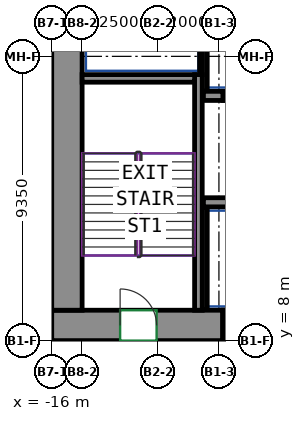
"""IFC4 building model, lengths in metres.
Left out: names, types, materials, properties, quantities, classifications, styles, units other than length and angle.
Written with IfcOpenShell. Run it as: python <this file> out.ifc"""

import sys

from ifc_helpers import new_model, si_unit, direction, frame, frame_2d, origin, place, context, subcontext, project, spatial, rectangle, extrude, source, transform, mapped, element, fill, save


model = new_model("IFC4")
c1 = context("Model", 3, precision=1e-05, world=origin(), true_north=direction((0.0, 1.0)))
c2 = subcontext(c1, "Body", "Model", "MODEL_VIEW")
j1 = project(units=[si_unit("LENGTHUNIT", "METRE"), si_unit("PLANEANGLEUNIT", "RADIAN")], contexts=[c1])
p1 = place(None, origin())
s1 = spatial("IfcSite", under=j1, at=p1, CompositionType="ELEMENT")
p2 = place(p1, origin())
s2 = spatial("IfcBuilding", under=s1, at=p2, CompositionType="ELEMENT")
p3 = place(p2, frame((0.0, 0.0, 13.5)))
s3 = spatial("IfcBuildingStorey", under=s2, at=p3, CompositionType="ELEMENT", Elevation=13.5)
m1 = source(origin(), c2, "Body", "SweptSolid", [
    extrude(rectangle(XDim=5.63, YDim=1.0, at=frame_2d((2.815, 0.0))), origin(), (0.0, 0.0, 1.0), 4.1),
])
p4 = place(p3, frame((-16.0, 8.5, 0.0), z_axis=(0.0, 0.0, 1.0), x_axis=(1.0, 0.0, 0.0)))
e1 = element("IfcWall", 1, at=p4, inside=s3, PredefinedType="SHEAR", context=c2, shape_type="MappedRepresentation", body=[
    mapped(m1, transform((0.0, 0.0, 0.0))),
])
p5 = place(p4, frame((2.25, 0.0, 0.0)))
e2 = element("IfcOpeningElement", 2, at=p5, cuts=e1, PredefinedType="OPENING", context=c2, shape_type="SweptSolid", body=[
    extrude(rectangle(XDim=1.2, YDim=2.1, at=frame_2d((0.6, 1.05))), frame((0.0, 0.51, 0.0), z_axis=(0.0, -1.0, 0.0), x_axis=(1.0, 0.0, 0.0)), (0.0, 0.0, 1.0), 1.02),
])
m2 = source(origin(), c2, "Body", "SweptSolid", [
    extrude(rectangle(XDim=12.0, YDim=1.0, at=frame_2d((6.0, 0.0))), origin(), (0.0, 0.0, 1.0), 4.1),
])
p6 = place(p3, frame((-15.5, 9.0, 0.0), z_axis=(0.0, 0.0, 1.0), x_axis=(0.0, 1.0, 0.0)))
e3 = element("IfcWall", 3, at=p6, inside=s3, PredefinedType="SHEAR", context=c2, shape_type="MappedRepresentation", body=[
    mapped(m2, transform((0.0, 0.0, 0.0))),
])
m3 = source(origin(), c2, "Body", "SweptSolid", [
    extrude(rectangle(XDim=7.75, YDim=0.25, at=frame_2d((3.875, 0.0))), origin(), (0.0, 0.0, 1.0), 4.1),
])
p7 = place(p3, frame((-11.175, 9.0, 0.0), z_axis=(0.0, 0.0, 1.0), x_axis=(0.0, 1.0, 0.0)))
e4 = element("IfcWall", 4, at=p7, inside=s3, PredefinedType="SHEAR", context=c2, shape_type="MappedRepresentation", body=[
    mapped(m3, transform((0.0, 0.0, 0.0))),
])
m4 = source(origin(), c2, "Body", "SweptSolid", [
    extrude(rectangle(XDim=3.7, YDim=0.25, at=frame_2d((1.85, 0.0))), origin(), (0.0, 0.0, 1.0), 4.1),
])
p8 = place(p3, frame((-15.0, 16.625, 0.0), z_axis=(0.0, 0.0, 1.0), x_axis=(1.0, 0.0, 0.0)))
e5 = element("IfcWall", 5, at=p8, inside=s3, PredefinedType="SHEAR", context=c2, shape_type="MappedRepresentation", body=[
    mapped(m4, transform((0.0, 0.0, 0.0))),
])
m5 = source(origin(), c2, "Body", "SweptSolid", [
    extrude(rectangle(XDim=6.0, YDim=0.3, at=frame_2d((3.0, 0.0))), origin(), (0.0, 0.0, 1.0), 4.1),
])
p9 = place(p3, frame((-11.01, 12.55, 0.0), z_axis=(0.0, 0.0, 1.0), x_axis=(1.0, 0.0, 0.0)))
e6 = element("IfcWall", 6, at=p9, inside=s3, PredefinedType="SHEAR", context=c2, shape_type="MappedRepresentation", body=[
    mapped(m5, transform((0.0, 0.0, 0.0))),
])
m6 = source(origin(), c2, "Body", "SweptSolid", [
    extrude(rectangle(XDim=0.64, YDim=0.3, at=frame_2d((0.32, 0.0))), origin(), (0.0, 0.0, 1.0), 4.1),
])
p10 = place(p3, frame((-11.01, 16.05, 0.0), z_axis=(0.0, 0.0, 1.0), x_axis=(1.0, 0.0, 0.0)))
e7 = element("IfcWall", 7, at=p10, inside=s3, PredefinedType="SHEAR", context=c2, shape_type="MappedRepresentation", body=[
    mapped(m6, transform((0.0, 0.0, 0.0))),
])
m7 = source(origin(), c2, "Body", "SweptSolid", [
    extrude(rectangle(XDim=1.4, YDim=1.0, at=frame_2d((0.7, 0.0))), origin(), (0.0, 0.0, 1.0), 0.2),
])
p11 = place(p3, frame((-10.37, 8.5, 3.9), z_axis=(0.0, 0.0, 1.0), x_axis=(1.0, 0.0, 0.0)))
e8 = element("IfcWall", 8, at=p11, inside=s3, PredefinedType="SHEAR", context=c2, shape_type="MappedRepresentation", body=[
    mapped(m7, transform((0.0, 0.0, 0.0))),
])
m8 = source(origin(), c2, "Body", "SweptSolid", [
    extrude(rectangle(XDim=1.4, YDim=0.3, at=frame_2d((0.7, 0.0))), origin(), (0.0, 0.0, 1.0), 4.1),
])
p12 = place(p3, frame((-10.37, 16.05, 0.0), z_axis=(0.0, 0.0, 1.0), x_axis=(1.0, 0.0, 0.0)))
e9 = element("IfcWall", 9, at=p12, inside=s3, PredefinedType="PARTITIONING", context=c2, shape_type="MappedRepresentation", body=[
    mapped(m8, transform((0.0, 0.0, 0.0))),
])
p13 = place(p12, frame((0.15, 0.0, 0.0)))
e10 = element("IfcOpeningElement", 10, at=p13, cuts=e9, PredefinedType="OPENING", context=c2, shape_type="SweptSolid", body=[
    extrude(rectangle(XDim=1.1, YDim=2.1, at=frame_2d((0.55, 1.05))), frame((0.0, 0.16, 0.0), z_axis=(0.0, -1.0, 0.0), x_axis=(1.0, 0.0, 0.0)), (0.0, 0.0, 1.0), 0.32),
])
m9 = source(origin(), c2, "Body", "SweptSolid", [
    extrude(rectangle(XDim=3.275, YDim=0.165, at=frame_2d((1.638, 0.0))), origin(), (0.0, 0.0, 1.0), 4.1),
])
p14 = place(p3, frame((-10.968, 16.2, 0.0), z_axis=(0.0, 0.0, 1.0), x_axis=(0.0, 1.0, 0.0)))
e11 = element("IfcWall", 11, at=p14, inside=s3, PredefinedType="PARTITIONING", context=c2, shape_type="MappedRepresentation", body=[
    mapped(m9, transform((0.0, 0.0, 0.0))),
])
m10 = source(origin(), c2, "Body", "SweptSolid", [
    extrude(rectangle(XDim=2.725, YDim=0.085, at=frame_2d((1.363, 0.0))), origin(), (0.0, 0.0, 1.0), 4.1),
])
p15 = place(p3, frame((-11.093, 16.75, 0.0), z_axis=(0.0, 0.0, 1.0), x_axis=(0.0, 1.0, 0.0)))
e12 = element("IfcWall", 12, at=p15, inside=s3, PredefinedType="PARTITIONING", context=c2, shape_type="MappedRepresentation", body=[
    mapped(m10, transform((0.0, 0.0, 0.0))),
])
m11 = source(origin(), c2, "Body", "SweptSolid", [
    extrude(rectangle(XDim=3.4, YDim=0.165, at=frame_2d((1.7, 0.0))), origin(), (0.0, 0.0, 1.0), 4.1),
])
p16 = place(p3, frame((-10.968, 9.0, 0.0), z_axis=(0.0, 0.0, 1.0), x_axis=(0.0, 1.0, 0.0)))
e13 = element("IfcWall", 13, at=p16, inside=s3, PredefinedType="PARTITIONING", context=c2, shape_type="MappedRepresentation", body=[
    mapped(m11, transform((0.0, 0.0, 0.0))),
])
m12 = source(origin(), c2, "Body", "SweptSolid", [
    extrude(rectangle(XDim=1.4, YDim=1.0, at=frame_2d((0.7, 0.0))), origin(), (0.0, 0.0, 1.0), 2.7),
])
p17 = place(p3, frame((-10.37, 8.5, 0.0), z_axis=(0.0, 0.0, 1.0), x_axis=(1.0, 0.0, 0.0)))
e14 = element("IfcWall", 14, at=p17, inside=s3, PredefinedType="PARTITIONING", context=c2, shape_type="MappedRepresentation", body=[
    mapped(m12, transform((0.0, 0.0, 0.0))),
])
p18 = place(p17, frame((0.25, 0.0, 0.0)))
e15 = element("IfcOpeningElement", 15, at=p18, cuts=e14, PredefinedType="OPENING", context=c2, shape_type="SweptSolid", body=[
    extrude(rectangle(XDim=0.9, YDim=2.1, at=frame_2d((0.45, 1.05))), frame((0.0, 0.51, 0.0), z_axis=(0.0, -1.0, 0.0), x_axis=(1.0, 0.0, 0.0)), (0.0, 0.0, 1.0), 1.02),
])
p19 = place(p5, origin())
e16 = element("IfcDoor", 16, at=p19, inside=s3, OperationType="DOUBLE_DOOR_SINGLE_SWING", PredefinedType="DOOR", context=c2, shape_type="SweptSolid", body=[
    extrude(rectangle(XDim=1.2, YDim=2.1, at=frame_2d((0.6, 1.05))), frame((0.0, 0.405, 0.0), z_axis=(0.0, -1.0, 0.0), x_axis=(1.0, 0.0, 0.0)), (0.0, 0.0, 1.0), 0.05),
])
fill(e2, e16)
save(model, sys.argv[1])
